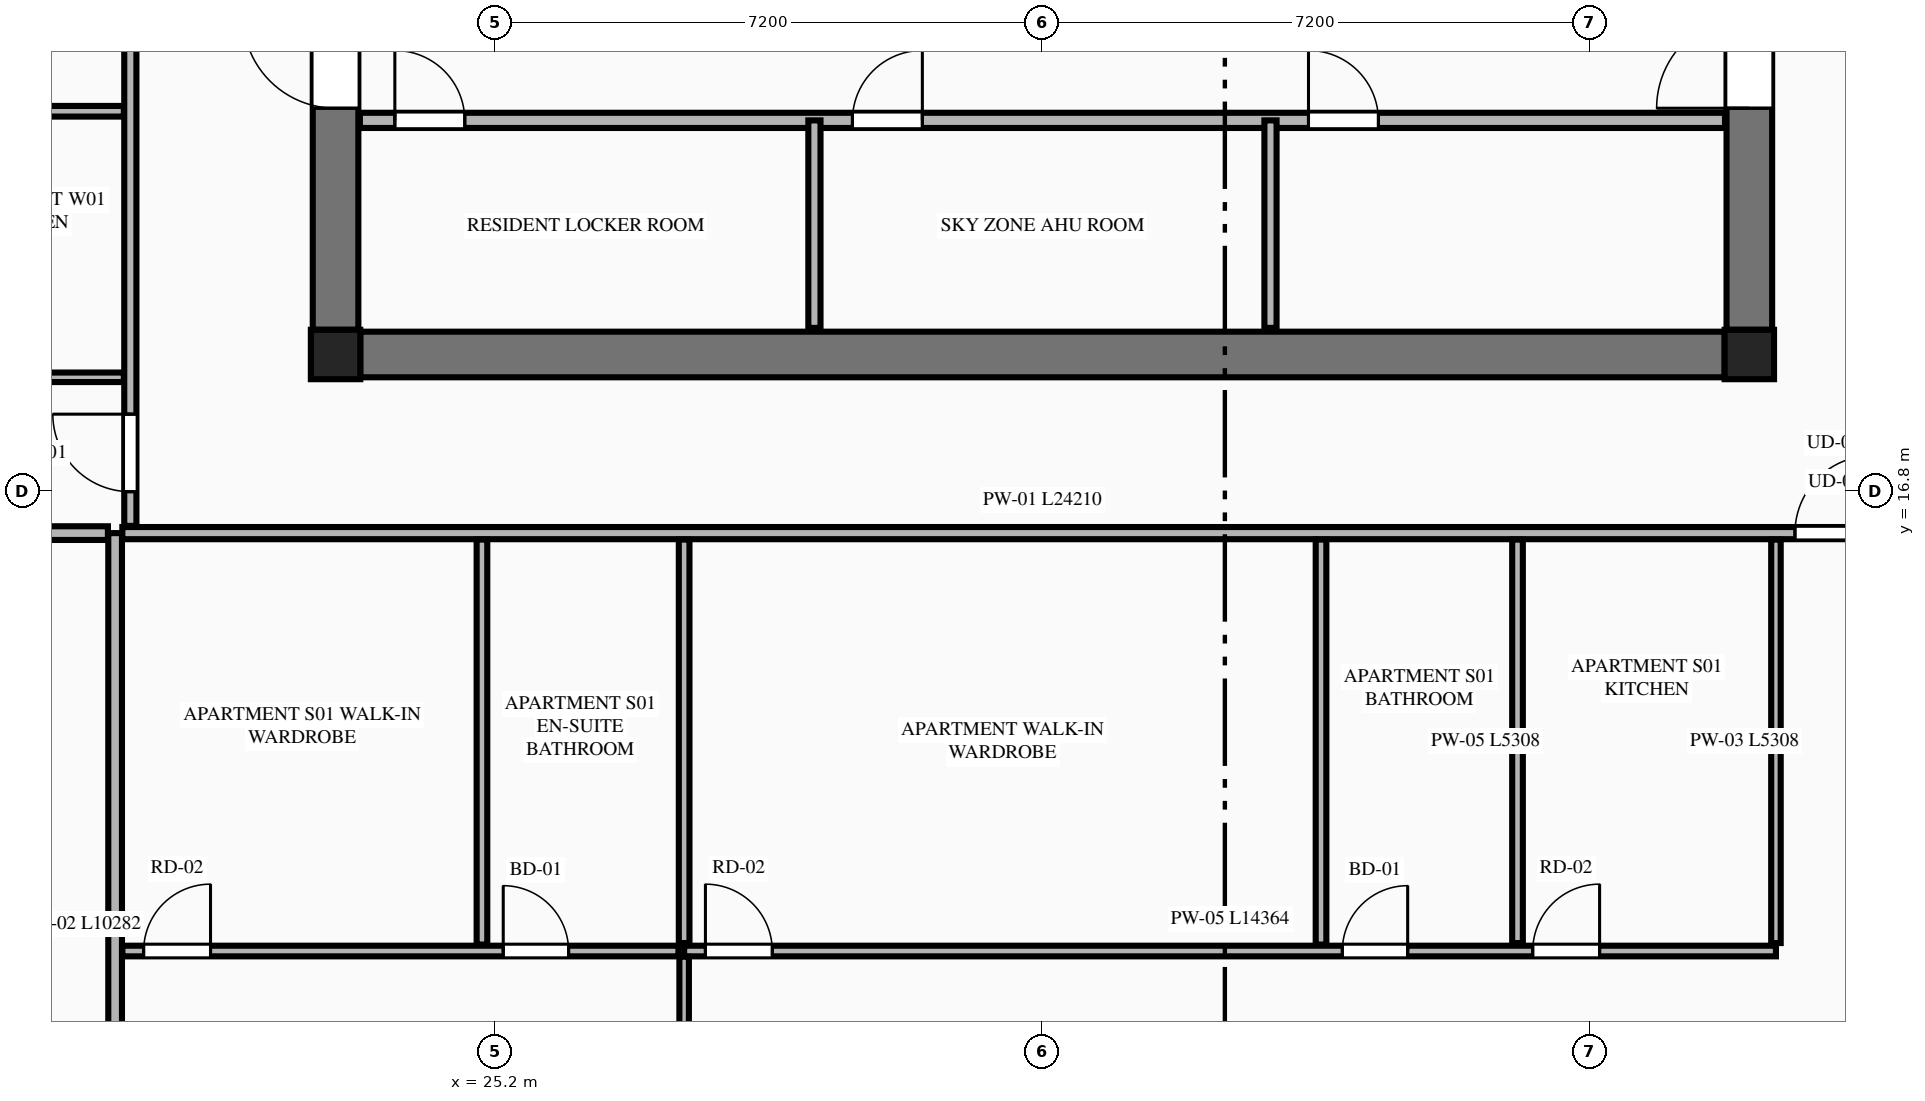
"""IFC4 building model, lengths in metres.
Left out: names, types, materials, properties, quantities, classifications, styles, units other than length and angle.
Written with IfcOpenShell. Run it as: python <this file> out.ifc"""

import sys

from ifc_helpers import new_model, si_unit, direction, frame, frame_2d, origin, origin_2d, place, context, subcontext, project, spatial, rectangle, extrude, element, fill, save


model = new_model("IFC4")
c1 = context("Model", 3, precision=1e-05, world=origin(), true_north=direction((0.0, 1.0)))
c2 = subcontext(c1, "Body", "Model", "MODEL_VIEW")
j1 = project(units=[si_unit("LENGTHUNIT", "METRE"), si_unit("PLANEANGLEUNIT", "RADIAN")], contexts=[c1])
p1 = place(None, origin())
s1 = spatial("IfcSite", under=j1, at=p1, CompositionType="ELEMENT")
p2 = place(p1, origin())
s2 = spatial("IfcBuilding", under=s1, at=p2, CompositionType="ELEMENT")
p3 = place(p2, frame((0.0, 0.0, 207.4)))
s3 = spatial("IfcBuildingStorey", under=s2, at=p3, CompositionType="ELEMENT", Elevation=207.4)
for number, where, z_axis, x_axis in (
    (1, (23.1, 18.6, 0.0), (0.0, 0.0, 1.0), (1.0, 0.0, 0.0)),
    (2, (41.7, 18.6, 0.0), (0.0, 0.0, 1.0), (1.0, 0.0, 0.0)),
):
    element("IfcColumn", number, at=place(p3, frame(where, z_axis=z_axis, x_axis=x_axis)), inside=s3, PredefinedType="COLUMN", context=c2, shape_type="SweptSolid", body=[
        extrude(rectangle(XDim=0.65, YDim=0.65, at=origin_2d()), origin(), (0.0, 0.0, 1.0), 3.55),
    ])
p4 = place(p3, frame((23.425, 18.6, 0.0), z_axis=(0.0, 0.0, 1.0), x_axis=(1.0, 0.0, 0.0)))
e3 = element("IfcWall", 3, at=p4, inside=s3, PredefinedType="SHEAR", context=c2, shape_type="SweptSolid", body=[
    extrude(rectangle(XDim=17.95, YDim=0.6, at=frame_2d((8.975, 0.0))), origin(), (0.0, 0.0, 1.0), 3.35),
])
p5 = place(p3, frame((23.1, 18.925, 0.0), z_axis=(0.0, 0.0, 1.0), x_axis=(0.0, 1.0, 0.0)))
e4 = element("IfcWall", 4, at=p5, inside=s3, PredefinedType="SHEAR", context=c2, shape_type="SweptSolid", body=[
    extrude(rectangle(XDim=13.95, YDim=0.6, at=frame_2d((6.975, 0.0))), origin(), (0.0, 0.0, 1.0), 3.35),
])
p6 = place(p5, frame((2.915, 0.0, 0.0)))
e5 = element("IfcOpeningElement", 5, at=p6, cuts=e4, PredefinedType="OPENING", context=c2, shape_type="SweptSolid", body=[
    extrude(rectangle(XDim=1.22, YDim=2.25, at=frame_2d((0.61, 1.125))), frame((0.0, 0.31, 0.0), z_axis=(0.0, -1.0, 0.0), x_axis=(1.0, 0.0, 0.0)), (0.0, 0.0, 1.0), 0.62),
])
p7 = place(p3, frame((41.7, 18.925, 0.0), z_axis=(0.0, 0.0, 1.0), x_axis=(0.0, 1.0, 0.0)))
e6 = element("IfcWall", 6, at=p7, inside=s3, PredefinedType="SHEAR", context=c2, shape_type="SweptSolid", body=[
    extrude(rectangle(XDim=13.95, YDim=0.6, at=frame_2d((6.975, 0.0))), origin(), (0.0, 0.0, 1.0), 3.35),
])
p8 = place(p7, frame((2.915, 0.0, 0.0)))
e7 = element("IfcOpeningElement", 7, at=p8, cuts=e6, PredefinedType="OPENING", context=c2, shape_type="SweptSolid", body=[
    extrude(rectangle(XDim=1.22, YDim=2.25, at=frame_2d((0.61, 1.125))), frame((0.0, 0.31, 0.0), z_axis=(0.0, -1.0, 0.0), x_axis=(1.0, 0.0, 0.0)), (0.0, 0.0, 1.0), 0.62),
])
p9 = place(p3, frame((23.42, 21.68, 0.0), z_axis=(0.0, 0.0, 1.0), x_axis=(1.0, 0.0, 0.0)))
e8 = element("IfcWall", 8, at=p9, inside=s3, PredefinedType="PLUMBINGWALL", context=c2, shape_type="SweptSolid", body=[
    extrude(rectangle(XDim=17.96, YDim=0.2, at=frame_2d((8.98, 0.0))), origin(), (0.0, 0.0, 1.0), 3.35),
])
p10 = place(p9, frame((0.46, 0.0, 0.0)))
e9 = element("IfcOpeningElement", 9, at=p10, cuts=e8, PredefinedType="OPENING", context=c2, shape_type="SweptSolid", body=[
    extrude(rectangle(XDim=0.92, YDim=2.15, at=frame_2d((0.46, 1.075))), frame((0.0, 0.11, 0.0), z_axis=(0.0, -1.0, 0.0), x_axis=(1.0, 0.0, 0.0)), (0.0, 0.0, 1.0), 0.22),
])
p11 = place(p9, frame((6.48, 0.0, 0.0)))
e10 = element("IfcOpeningElement", 10, at=p11, cuts=e8, PredefinedType="OPENING", context=c2, shape_type="SweptSolid", body=[
    extrude(rectangle(XDim=0.92, YDim=2.15, at=frame_2d((0.46, 1.075))), frame((0.0, 0.11, 0.0), z_axis=(0.0, -1.0, 0.0), x_axis=(1.0, 0.0, 0.0)), (0.0, 0.0, 1.0), 0.22),
])
p12 = place(p9, frame((12.48, 0.0, 0.0)))
e11 = element("IfcOpeningElement", 11, at=p12, cuts=e8, PredefinedType="OPENING", context=c2, shape_type="SweptSolid", body=[
    extrude(rectangle(XDim=0.92, YDim=2.15, at=frame_2d((0.46, 1.075))), frame((0.0, 0.11, 0.0), z_axis=(0.0, -1.0, 0.0), x_axis=(1.0, 0.0, 0.0)), (0.0, 0.0, 1.0), 0.22),
])
for number, where, z_axis, x_axis in (
    (12, (29.4, 18.95, 0.0), (0.0, 0.0, 1.0), (0.0, 1.0, 0.0)),
    (13, (35.4, 18.95, 0.0), (0.0, 0.0, 1.0), (0.0, 1.0, 0.0)),
):
    element("IfcWall", number, at=place(p3, frame(where, z_axis=z_axis, x_axis=x_axis)), inside=s3, PredefinedType="PARTITIONING", context=c2, shape_type="SweptSolid", body=[
        extrude(rectangle(XDim=2.73, YDim=0.16, at=frame_2d((1.365, 0.0))), origin(), (0.0, 0.0, 1.0), 3.35),
    ])
p13 = place(p3, frame((20.2, 5.968, 0.0), z_axis=(0.0, 0.0, 1.0), x_axis=(0.0, 1.0, 0.0)))
e14 = element("IfcWall", 14, at=p13, inside=s3, PredefinedType="PARTITIONING", context=c2, shape_type="SweptSolid", body=[
    extrude(rectangle(XDim=10.282, YDim=0.18, at=frame_2d((5.141, 0.0))), origin(), (0.0, 0.0, 1.0), 3.35),
])
p14 = place(p3, frame((20.295, 16.25, 0.0), z_axis=(0.0, 0.0, 1.0), x_axis=(1.0, 0.0, 0.0)))
e15 = element("IfcWall", 15, at=p14, inside=s3, PredefinedType="PARTITIONING", context=c2, shape_type="SweptSolid", body=[
    extrude(rectangle(XDim=24.21, YDim=0.16, at=frame_2d((12.105, 0.0))), origin(), (0.0, 0.0, 1.0), 3.35),
])
p15 = place(p14, frame((22.005, 0.0, 0.0)))
e16 = element("IfcOpeningElement", 16, at=p15, cuts=e15, PredefinedType="OPENING", context=c2, shape_type="SweptSolid", body=[
    extrude(rectangle(XDim=1.02, YDim=2.25, at=frame_2d((0.51, 1.125))), frame((0.0, 0.09, 0.0), z_axis=(0.0, -1.0, 0.0), x_axis=(1.0, 0.0, 0.0)), (0.0, 0.0, 1.0), 0.18),
])
p16 = place(p3, frame((42.05, 10.857, 0.0), z_axis=(0.0, 0.0, 1.0), x_axis=(0.0, 1.0, 0.0)))
e17 = element("IfcWall", 17, at=p16, inside=s3, PredefinedType="PARTITIONING", context=c2, shape_type="SweptSolid", body=[
    extrude(rectangle(XDim=5.308, YDim=0.125, at=frame_2d((2.654, 0.0))), origin(), (0.0, 0.0, 1.0), 2.807),
])
p17 = place(p3, frame((27.686, 10.752, 0.0), z_axis=(0.0, 0.0, 1.0), x_axis=(1.0, 0.0, 0.0)))
e18 = element("IfcWall", 18, at=p17, inside=s3, PredefinedType="PLUMBINGWALL", context=c2, shape_type="SweptSolid", body=[
    extrude(rectangle(XDim=14.364, YDim=0.14, at=frame_2d((7.182, 0.0))), origin(), (0.0, 0.0, 1.0), 3.35),
])
p18 = place(p17, frame((0.28, 0.0, 0.0)))
e19 = element("IfcOpeningElement", 19, at=p18, cuts=e18, PredefinedType="OPENING", context=c2, shape_type="SweptSolid", body=[
    extrude(rectangle(XDim=0.88, YDim=2.15, at=frame_2d((0.44, 1.075))), frame((0.0, 0.08, 0.0), z_axis=(0.0, -1.0, 0.0), x_axis=(1.0, 0.0, 0.0)), (0.0, 0.0, 1.0), 0.16),
])
p19 = place(p17, frame((8.659, 0.0, 0.0)))
e20 = element("IfcOpeningElement", 20, at=p19, cuts=e18, PredefinedType="OPENING", context=c2, shape_type="SweptSolid", body=[
    extrude(rectangle(XDim=0.86, YDim=2.1, at=frame_2d((0.43, 1.05))), frame((0.0, 0.08, 0.0), z_axis=(0.0, -1.0, 0.0), x_axis=(1.0, 0.0, 0.0)), (0.0, 0.0, 1.0), 0.16),
])
p20 = place(p17, frame((11.164, 0.0, 0.0)))
e21 = element("IfcOpeningElement", 21, at=p20, cuts=e18, PredefinedType="OPENING", context=c2, shape_type="SweptSolid", body=[
    extrude(rectangle(XDim=0.88, YDim=2.15, at=frame_2d((0.44, 1.075))), frame((0.0, 0.08, 0.0), z_axis=(0.0, -1.0, 0.0), x_axis=(1.0, 0.0, 0.0)), (0.0, 0.0, 1.0), 0.16),
])
p21 = place(p3, frame((20.295, 10.752, 0.0), z_axis=(0.0, 0.0, 1.0), x_axis=(1.0, 0.0, 0.0)))
e22 = element("IfcWall", 22, at=p21, inside=s3, PredefinedType="PLUMBINGWALL", context=c2, shape_type="SweptSolid", body=[
    extrude(rectangle(XDim=7.316, YDim=0.14, at=frame_2d((3.658, 0.0))), origin(), (0.0, 0.0, 1.0), 3.35),
])
p22 = place(p21, frame((0.28, 0.0, 0.0)))
e23 = element("IfcOpeningElement", 23, at=p22, cuts=e22, PredefinedType="OPENING", context=c2, shape_type="SweptSolid", body=[
    extrude(rectangle(XDim=0.88, YDim=2.15, at=frame_2d((0.44, 1.075))), frame((0.0, 0.08, 0.0), z_axis=(0.0, -1.0, 0.0), x_axis=(1.0, 0.0, 0.0)), (0.0, 0.0, 1.0), 0.16),
])
p23 = place(p21, frame((5.011, 0.0, 0.0)))
e24 = element("IfcOpeningElement", 24, at=p23, cuts=e22, PredefinedType="OPENING", context=c2, shape_type="SweptSolid", body=[
    extrude(rectangle(XDim=0.86, YDim=2.1, at=frame_2d((0.43, 1.05))), frame((0.0, 0.08, 0.0), z_axis=(0.0, -1.0, 0.0), x_axis=(1.0, 0.0, 0.0)), (0.0, 0.0, 1.0), 0.16),
])
for number, where, z_axis, x_axis in (
    (25, (38.65, 10.857, 0.0), (0.0, 0.0, 1.0), (0.0, 1.0, 0.0)),
    (26, (27.686, 10.857, 0.0), (0.0, 0.0, 1.0), (0.0, 1.0, 0.0)),
):
    element("IfcWall", number, at=place(p3, frame(where, z_axis=z_axis, x_axis=x_axis)), inside=s3, PredefinedType="PLUMBINGWALL", context=c2, shape_type="SweptSolid", body=[
        extrude(rectangle(XDim=5.308, YDim=0.14, at=frame_2d((2.654, 0.0))), origin(), (0.0, 0.0, 1.0), 3.35),
    ])
p24 = place(p3, frame((27.686, 5.665, 0.0), z_axis=(0.0, 0.0, 1.0), x_axis=(0.0, 1.0, 0.0)))
e27 = element("IfcWall", 27, at=p24, inside=s3, PredefinedType="PARTITIONING", context=c2, shape_type="SweptSolid", body=[
    extrude(rectangle(XDim=5.012, YDim=0.125, at=frame_2d((2.506, 0.0))), origin(), (0.0, 0.0, 1.0), 3.35),
])
p25 = place(p24, frame((1.05, 0.0, 0.0)))
e28 = element("IfcOpeningElement", 28, at=p25, cuts=e27, PredefinedType="OPENING", context=c2, shape_type="SweptSolid", body=[
    extrude(rectangle(XDim=0.92, YDim=2.15, at=frame_2d((0.46, 1.075))), frame((0.0, 0.073, 0.0), z_axis=(0.0, -1.0, 0.0), x_axis=(1.0, 0.0, 0.0)), (0.0, 0.0, 1.0), 0.145),
])
p26 = place(p3, frame((36.065, 10.837, 0.0), z_axis=(0.0, 0.0, 1.0), x_axis=(0.0, 1.0, 0.0)))
e29 = element("IfcWall", 29, at=p26, inside=s3, PredefinedType="PLUMBINGWALL", context=c2, shape_type="SweptSolid", body=[
    extrude(rectangle(XDim=5.328, YDim=0.14, at=frame_2d((2.664, 0.0))), origin(), (0.0, 0.0, 1.0), 2.807),
])
p27 = place(p3, frame((25.026, 10.837, 0.0), z_axis=(0.0, 0.0, 1.0), x_axis=(0.0, 1.0, 0.0)))
e30 = element("IfcWall", 30, at=p27, inside=s3, PredefinedType="PLUMBINGWALL", context=c2, shape_type="SweptSolid", body=[
    extrude(rectangle(XDim=5.328, YDim=0.14, at=frame_2d((2.664, 0.0))), origin(), (0.0, 0.0, 1.0), 3.35),
])
p28 = place(p3, frame((14.211, 16.25, 0.0), z_axis=(0.0, 0.0, 1.0), x_axis=(1.0, 0.0, 0.0)))
e31 = element("IfcWall", 31, at=p28, inside=s3, PredefinedType="PARTITIONING", context=c2, shape_type="SweptSolid", body=[
    extrude(rectangle(XDim=5.894, YDim=0.18, at=frame_2d((2.947, 0.0))), origin(), (0.0, 0.0, 1.0), 3.35),
])
p29 = place(p3, frame((20.4, 16.345, 0.0), z_axis=(0.0, 0.0, 1.0), x_axis=(0.0, 1.0, 0.0)))
e32 = element("IfcWall", 32, at=p29, inside=s3, PredefinedType="PARTITIONING", context=c2, shape_type="SweptSolid", body=[
    extrude(rectangle(XDim=18.71, YDim=0.16, at=frame_2d((9.355, 0.0))), origin(), (0.0, 0.0, 1.0), 3.35),
])
p30 = place(p29, frame((0.45, 0.0, 0.0)))
e33 = element("IfcOpeningElement", 33, at=p30, cuts=e32, PredefinedType="OPENING", context=c2, shape_type="SweptSolid", body=[
    extrude(rectangle(XDim=1.02, YDim=2.25, at=frame_2d((0.51, 1.125))), frame((0.0, 0.09, 0.0), z_axis=(0.0, -1.0, 0.0), x_axis=(1.0, 0.0, 0.0)), (0.0, 0.0, 1.0), 0.18),
])
p31 = place(p3, frame((17.635, 18.3, 0.0), z_axis=(0.0, 0.0, 1.0), x_axis=(1.0, 0.0, 0.0)))
e34 = element("IfcWall", 34, at=p31, inside=s3, PredefinedType="PARTITIONING", context=c2, shape_type="SweptSolid", body=[
    extrude(rectangle(XDim=2.68, YDim=0.125, at=frame_2d((1.34, 0.0))), origin(), (0.0, 0.0, 1.0), 2.807),
])
p32 = place(p3, frame((17.635, 21.8, 0.0), z_axis=(0.0, 0.0, 1.0), x_axis=(1.0, 0.0, 0.0)))
e35 = element("IfcWall", 35, at=p32, inside=s3, PredefinedType="PLUMBINGWALL", context=c2, shape_type="SweptSolid", body=[
    extrude(rectangle(XDim=2.68, YDim=0.14, at=frame_2d((1.34, 0.0))), origin(), (0.0, 0.0, 1.0), 3.35),
])
p33 = place(p6, origin())
e36 = element("IfcDoor", 36, at=p33, inside=s3, OperationType="SINGLE_SWING_RIGHT", PredefinedType="DOOR", context=c2, shape_type="SweptSolid", body=[
    extrude(rectangle(XDim=1.22, YDim=2.25, at=frame_2d((0.61, 1.125))), frame((0.0, 0.025, 0.0), z_axis=(0.0, -1.0, 0.0), x_axis=(1.0, 0.0, 0.0)), (0.0, 0.0, 1.0), 0.05),
])
fill(e5, e36)
p34 = place(p8, origin())
e37 = element("IfcDoor", 37, at=p34, inside=s3, OperationType="SINGLE_SWING_LEFT", PredefinedType="DOOR", context=c2, shape_type="SweptSolid", body=[
    extrude(rectangle(XDim=1.22, YDim=2.25, at=frame_2d((0.61, 1.125))), frame((0.0, 0.025, 0.0), z_axis=(0.0, -1.0, 0.0), x_axis=(1.0, 0.0, 0.0)), (0.0, 0.0, 1.0), 0.05),
])
fill(e7, e37)
p35 = place(p10, origin())
e38 = element("IfcDoor", 38, at=p35, inside=s3, OperationType="SINGLE_SWING_LEFT", PredefinedType="DOOR", context=c2, shape_type="SweptSolid", body=[
    extrude(rectangle(XDim=0.92, YDim=2.15, at=frame_2d((0.46, 1.075))), frame((0.0, 0.025, 0.0), z_axis=(0.0, -1.0, 0.0), x_axis=(1.0, 0.0, 0.0)), (0.0, 0.0, 1.0), 0.05),
])
fill(e9, e38)
p36 = place(p11, origin())
e39 = element("IfcDoor", 39, at=p36, inside=s3, OperationType="SINGLE_SWING_RIGHT", PredefinedType="DOOR", context=c2, shape_type="SweptSolid", body=[
    extrude(rectangle(XDim=0.92, YDim=2.15, at=frame_2d((0.46, 1.075))), frame((0.0, 0.025, 0.0), z_axis=(0.0, -1.0, 0.0), x_axis=(1.0, 0.0, 0.0)), (0.0, 0.0, 1.0), 0.05),
])
fill(e10, e39)
p37 = place(p12, origin())
e40 = element("IfcDoor", 40, at=p37, inside=s3, OperationType="SINGLE_SWING_LEFT", PredefinedType="DOOR", context=c2, shape_type="SweptSolid", body=[
    extrude(rectangle(XDim=0.92, YDim=2.15, at=frame_2d((0.46, 1.075))), frame((0.0, 0.025, 0.0), z_axis=(0.0, -1.0, 0.0), x_axis=(1.0, 0.0, 0.0)), (0.0, 0.0, 1.0), 0.05),
])
fill(e11, e40)
p38 = place(p18, origin())
e41 = element("IfcDoor", 41, at=p38, inside=s3, OperationType="SINGLE_SWING_LEFT", PredefinedType="DOOR", context=c2, shape_type="SweptSolid", body=[
    extrude(rectangle(XDim=0.88, YDim=2.15, at=frame_2d((0.44, 1.075))), frame((0.0, 0.025, 0.0), z_axis=(0.0, -1.0, 0.0), x_axis=(1.0, 0.0, 0.0)), (0.0, 0.0, 1.0), 0.05),
])
fill(e19, e41)
p39 = place(p19, origin())
e42 = element("IfcDoor", 42, at=p39, inside=s3, OperationType="SINGLE_SWING_RIGHT", PredefinedType="DOOR", context=c2, shape_type="SweptSolid", body=[
    extrude(rectangle(XDim=0.86, YDim=2.1, at=frame_2d((0.43, 1.05))), frame((0.0, 0.025, 0.0), z_axis=(0.0, -1.0, 0.0), x_axis=(1.0, 0.0, 0.0)), (0.0, 0.0, 1.0), 0.05),
])
fill(e20, e42)
p40 = place(p22, origin())
e43 = element("IfcDoor", 43, at=p40, inside=s3, OperationType="SINGLE_SWING_RIGHT", PredefinedType="DOOR", context=c2, shape_type="SweptSolid", body=[
    extrude(rectangle(XDim=0.88, YDim=2.15, at=frame_2d((0.44, 1.075))), frame((0.0, 0.025, 0.0), z_axis=(0.0, -1.0, 0.0), x_axis=(1.0, 0.0, 0.0)), (0.0, 0.0, 1.0), 0.05),
])
fill(e23, e43)
p41 = place(p23, origin())
e44 = element("IfcDoor", 44, at=p41, inside=s3, OperationType="SINGLE_SWING_LEFT", PredefinedType="DOOR", context=c2, shape_type="SweptSolid", body=[
    extrude(rectangle(XDim=0.86, YDim=2.1, at=frame_2d((0.43, 1.05))), frame((0.0, 0.025, 0.0), z_axis=(0.0, -1.0, 0.0), x_axis=(1.0, 0.0, 0.0)), (0.0, 0.0, 1.0), 0.05),
])
fill(e24, e44)
p42 = place(p15, origin())
e45 = element("IfcDoor", 45, at=p42, inside=s3, OperationType="SINGLE_SWING_RIGHT", PredefinedType="DOOR", context=c2, shape_type="SweptSolid", body=[
    extrude(rectangle(XDim=1.02, YDim=2.25, at=frame_2d((0.51, 1.125))), frame((0.0, 0.025, 0.0), z_axis=(0.0, -1.0, 0.0), x_axis=(1.0, 0.0, 0.0)), (0.0, 0.0, 1.0), 0.05),
])
fill(e16, e45)
p43 = place(p20, origin())
e46 = element("IfcDoor", 46, at=p43, inside=s3, OperationType="SINGLE_SWING_RIGHT", PredefinedType="DOOR", context=c2, shape_type="SweptSolid", body=[
    extrude(rectangle(XDim=0.88, YDim=2.15, at=frame_2d((0.44, 1.075))), frame((0.0, 0.025, 0.0), z_axis=(0.0, -1.0, 0.0), x_axis=(1.0, 0.0, 0.0)), (0.0, 0.0, 1.0), 0.05),
])
fill(e21, e46)
p44 = place(p30, origin())
e47 = element("IfcDoor", 47, at=p44, inside=s3, OperationType="SINGLE_SWING_RIGHT", PredefinedType="DOOR", context=c2, shape_type="SweptSolid", body=[
    extrude(rectangle(XDim=1.02, YDim=2.25, at=frame_2d((0.51, 1.125))), frame((0.0, 0.025, 0.0), z_axis=(0.0, -1.0, 0.0), x_axis=(1.0, 0.0, 0.0)), (0.0, 0.0, 1.0), 0.05),
])
fill(e33, e47)
save(model, sys.argv[1])
